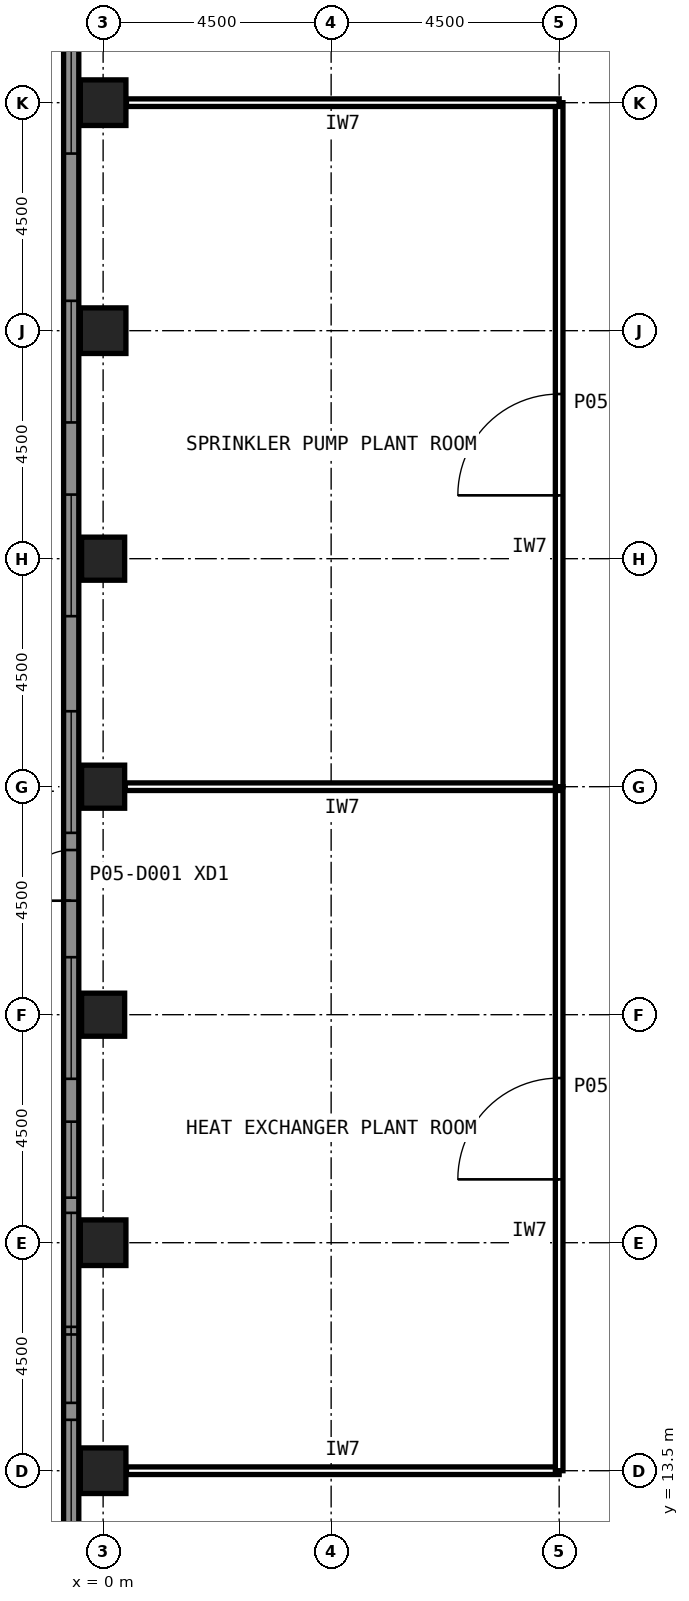
"""IFC4 building model, lengths in metres.
Left out: names, types, materials, properties, quantities, classifications, styles, units other than length and angle.
Written with IfcOpenShell. Run it as: python <this file> out.ifc"""

import sys

from ifc_helpers import new_model, si_unit, direction, frame, frame_2d, origin, origin_2d, place, context, subcontext, project, spatial, rectangle, hollow_rectangle, extrude, element, fill, save


model = new_model("IFC4")
c1 = context("Model", 3, precision=1e-05, world=origin(), true_north=direction((0.0, 1.0)))
c2 = subcontext(c1, "Body", "Model", "MODEL_VIEW")
j1 = project(units=[si_unit("LENGTHUNIT", "METRE"), si_unit("PLANEANGLEUNIT", "RADIAN")], contexts=[c1])
p1 = place(None, origin())
s1 = spatial("IfcSite", under=j1, at=p1, CompositionType="ELEMENT")
p2 = place(p1, origin())
s2 = spatial("IfcBuilding", under=s1, at=p2, CompositionType="ELEMENT")
p3 = place(p2, frame((0.0, 0.0, 23.0)))
s3 = spatial("IfcBuildingStorey", under=s2, at=p3, CompositionType="ELEMENT", Elevation=23.0)
for number, where, z_axis, x_axis in (
    (1, (0.0, 40.5, 0.0), (0.0, 0.0, 1.0), (1.0, 0.0, 0.0)),
    (2, (0.0, 36.0, 0.0), (0.0, 0.0, 1.0), (1.0, 0.0, 0.0)),
):
    element("IfcColumn", number, at=place(p3, frame(where, z_axis=z_axis, x_axis=x_axis)), inside=s3, PredefinedType="COLUMN", context=c2, shape_type="SweptSolid", body=[
        extrude(hollow_rectangle(XDim=0.9, YDim=0.9, WallThickness=0.063, at=origin_2d()), origin(), (0.0, 0.0, 1.0), 6.0),
    ])
for number, where, z_axis, x_axis in (
    (3, (0.0, 31.5, 0.0), (0.0, 0.0, 1.0), (1.0, 0.0, 0.0)),
    (4, (0.0, 27.0, 0.0), (0.0, 0.0, 1.0), (1.0, 0.0, 0.0)),
    (5, (0.0, 22.5, 0.0), (0.0, 0.0, 1.0), (1.0, 0.0, 0.0)),
):
    element("IfcColumn", number, at=place(p3, frame(where, z_axis=z_axis, x_axis=x_axis)), inside=s3, PredefinedType="COLUMN", context=c2, shape_type="SweptSolid", body=[
        extrude(hollow_rectangle(XDim=0.85, YDim=0.85, WallThickness=0.05, at=origin_2d()), origin(), (0.0, 0.0, 1.0), 6.0),
    ])
for number, where, z_axis, x_axis in (
    (6, (0.0, 18.0, 0.0), (0.0, 0.0, 1.0), (1.0, 0.0, 0.0)),
    (7, (0.0, 13.5, 0.0), (0.0, 0.0, 1.0), (1.0, 0.0, 0.0)),
):
    element("IfcColumn", number, at=place(p3, frame(where, z_axis=z_axis, x_axis=x_axis)), inside=s3, PredefinedType="COLUMN", context=c2, shape_type="SweptSolid", body=[
        extrude(hollow_rectangle(XDim=0.9, YDim=0.9, WallThickness=0.063, at=origin_2d()), origin(), (0.0, 0.0, 1.0), 6.0),
    ])
p4 = place(p3, frame((-0.63, 8.739, 0.0), z_axis=(0.0, 0.0, 1.0), x_axis=(0.0, 1.0, 0.0)))
e8 = element("IfcWall", 8, at=p4, inside=s3, PredefinedType="SOLIDWALL", context=c2, shape_type="SweptSolid", body=[
    extrude(rectangle(XDim=36.522, YDim=0.3, at=frame_2d((18.261, 0.0))), origin(), (0.0, 0.0, 1.0), 6.0),
])
p5 = place(p4, frame((16.011, 0.0, 0.0)))
e9 = element("IfcOpeningElement", 9, at=p5, cuts=e8, PredefinedType="OPENING", context=c2, shape_type="SweptSolid", body=[
    extrude(rectangle(XDim=1.0, YDim=2.1, at=frame_2d((0.5, 1.05))), frame((0.0, 0.16, 0.0), z_axis=(0.0, -1.0, 0.0), x_axis=(1.0, 0.0, 0.0)), (0.0, 0.0, 1.0), 0.32),
])
p6 = place(p4, frame((0.3, 0.0, 0.3)))
e10 = element("IfcOpeningElement", 10, at=p6, cuts=e8, PredefinedType="OPENING", context=c2, shape_type="SweptSolid", body=[
    extrude(rectangle(XDim=1.5, YDim=2.0, at=frame_2d((0.75, 1.0))), frame((0.0, 0.16, 0.0), z_axis=(0.0, -1.0, 0.0), x_axis=(1.0, 0.0, 0.0)), (0.0, 0.0, 1.0), 0.32),
])
p7 = place(p4, frame((3.365, 0.0, 1.2)))
e11 = element("IfcOpeningElement", 11, at=p7, cuts=e8, PredefinedType="OPENING", context=c2, shape_type="SweptSolid", body=[
    extrude(rectangle(XDim=2.4, YDim=3.0, at=frame_2d((1.2, 1.5))), frame((0.0, 0.16, 0.0), z_axis=(0.0, -1.0, 0.0), x_axis=(1.0, 0.0, 0.0)), (0.0, 0.0, 1.0), 0.32),
])
p8 = place(p4, frame((1.5, 0.0, 3.65)))
e12 = element("IfcOpeningElement", 12, at=p8, cuts=e8, PredefinedType="OPENING", context=c2, shape_type="SweptSolid", body=[
    extrude(rectangle(XDim=1.5, YDim=2.0, at=frame_2d((0.75, 1.0))), frame((0.0, 0.16, 0.0), z_axis=(0.0, -1.0, 0.0), x_axis=(1.0, 0.0, 0.0)), (0.0, 0.0, 1.0), 0.32),
])
p9 = place(p4, frame((6.1, 0.0, 3.6)))
e13 = element("IfcOpeningElement", 13, at=p9, cuts=e8, PredefinedType="OPENING", context=c2, shape_type="SweptSolid", body=[
    extrude(rectangle(XDim=1.5, YDim=2.0, at=frame_2d((0.75, 1.0))), frame((0.0, 0.16, 0.0), z_axis=(0.0, -1.0, 0.0), x_axis=(1.0, 0.0, 0.0)), (0.0, 0.0, 1.0), 0.32),
])
p10 = place(p4, frame((12.496, 0.0, 1.2)))
e14 = element("IfcOpeningElement", 14, at=p10, cuts=e8, PredefinedType="OPENING", context=c2, shape_type="SweptSolid", body=[
    extrude(rectangle(XDim=2.4, YDim=3.0, at=frame_2d((1.2, 1.5))), frame((0.0, 0.16, 0.0), z_axis=(0.0, -1.0, 0.0), x_axis=(1.0, 0.0, 0.0)), (0.0, 0.0, 1.0), 0.32),
])
p11 = place(p4, frame((7.45, 0.0, 0.3)))
e15 = element("IfcOpeningElement", 15, at=p11, cuts=e8, PredefinedType="OPENING", context=c2, shape_type="SweptSolid", body=[
    extrude(rectangle(XDim=2.4, YDim=3.0, at=frame_2d((1.2, 1.5))), frame((0.0, 0.16, 0.0), z_axis=(0.0, -1.0, 0.0), x_axis=(1.0, 0.0, 0.0)), (0.0, 0.0, 1.0), 0.32),
])
p12 = place(p4, frame((21.626, 0.0, 1.2)))
e16 = element("IfcOpeningElement", 16, at=p12, cuts=e8, PredefinedType="OPENING", context=c2, shape_type="SweptSolid", body=[
    extrude(rectangle(XDim=2.4, YDim=3.0, at=frame_2d((1.2, 1.5))), frame((0.0, 0.16, 0.0), z_axis=(0.0, -1.0, 0.0), x_axis=(1.0, 0.0, 0.0)), (0.0, 0.0, 1.0), 0.32),
])
p13 = place(p4, frame((10.15, 0.0, 0.3)))
e17 = element("IfcOpeningElement", 17, at=p13, cuts=e8, PredefinedType="OPENING", context=c2, shape_type="SweptSolid", body=[
    extrude(rectangle(XDim=1.5, YDim=2.0, at=frame_2d((0.75, 1.0))), frame((0.0, 0.16, 0.0), z_axis=(0.0, -1.0, 0.0), x_axis=(1.0, 0.0, 0.0)), (0.0, 0.0, 1.0), 0.32),
])
p14 = place(p4, frame((17.35, 0.0, 0.3)))
e18 = element("IfcOpeningElement", 18, at=p14, cuts=e8, PredefinedType="OPENING", context=c2, shape_type="SweptSolid", body=[
    extrude(rectangle(XDim=2.4, YDim=3.0, at=frame_2d((1.2, 1.5))), frame((0.0, 0.16, 0.0), z_axis=(0.0, -1.0, 0.0), x_axis=(1.0, 0.0, 0.0)), (0.0, 0.0, 1.0), 0.32),
])
p15 = place(p4, frame((30.757, 0.0, 1.2)))
e19 = element("IfcOpeningElement", 19, at=p15, cuts=e8, PredefinedType="OPENING", context=c2, shape_type="SweptSolid", body=[
    extrude(rectangle(XDim=2.4, YDim=3.0, at=frame_2d((1.2, 1.5))), frame((0.0, 0.16, 0.0), z_axis=(0.0, -1.0, 0.0), x_axis=(1.0, 0.0, 0.0)), (0.0, 0.0, 1.0), 0.32),
])
p16 = place(p4, frame((25.45, 0.0, 0.3)))
e20 = element("IfcOpeningElement", 20, at=p16, cuts=e8, PredefinedType="OPENING", context=c2, shape_type="SweptSolid", body=[
    extrude(rectangle(XDim=2.4, YDim=3.0, at=frame_2d((1.2, 1.5))), frame((0.0, 0.16, 0.0), z_axis=(0.0, -1.0, 0.0), x_axis=(1.0, 0.0, 0.0)), (0.0, 0.0, 1.0), 0.32),
])
p17 = place(p3, frame((0.46, 13.5, 0.0), z_axis=(0.0, 0.0, 1.0), x_axis=(1.0, 0.0, 0.0)))
e21 = element("IfcWall", 21, at=p17, inside=s3, PredefinedType="PARTITIONING", context=c2, shape_type="SweptSolid", body=[
    extrude(rectangle(XDim=8.54, YDim=0.15, at=frame_2d((4.27, 0.0))), origin(), (0.0, 0.0, 1.0), 4.989),
])
p18 = place(p3, frame((9.0, 13.5, 0.0), z_axis=(0.0, 0.0, 1.0), x_axis=(0.0, 1.0, 0.0)))
e22 = element("IfcWall", 22, at=p18, inside=s3, PredefinedType="PARTITIONING", context=c2, shape_type="SweptSolid", body=[
    extrude(rectangle(XDim=13.5, YDim=0.15, at=frame_2d((6.75, 0.0))), origin(), (0.0, 0.0, 1.0), 5.84),
])
p19 = place(p18, frame((5.75, 0.0, 0.0)))
e23 = element("IfcOpeningElement", 23, at=p19, cuts=e22, PredefinedType="OPENING", context=c2, shape_type="SweptSolid", body=[
    extrude(rectangle(XDim=2.0, YDim=2.4, at=frame_2d((1.0, 1.2))), frame((0.0, 0.085, 0.0), z_axis=(0.0, -1.0, 0.0), x_axis=(1.0, 0.0, 0.0)), (0.0, 0.0, 1.0), 0.17),
])
p20 = place(p3, frame((9.0, 27.0, 0.0), z_axis=(0.0, 0.0, 1.0), x_axis=(-1.0, 0.0, 0.0)))
e24 = element("IfcWall", 24, at=p20, inside=s3, PredefinedType="PARTITIONING", context=c2, shape_type="SweptSolid", body=[
    extrude(rectangle(XDim=8.565, YDim=0.15, at=frame_2d((4.282, 0.0))), origin(), (0.0, 0.0, 1.0), 4.989),
])
p21 = place(p3, frame((9.0, 27.0, 0.0), z_axis=(0.0, 0.0, 1.0), x_axis=(0.0, 1.0, 0.0)))
e25 = element("IfcWall", 25, at=p21, inside=s3, PredefinedType="PARTITIONING", context=c2, shape_type="SweptSolid", body=[
    extrude(rectangle(XDim=13.5, YDim=0.15, at=frame_2d((6.75, 0.0))), origin(), (0.0, 0.0, 1.0), 5.84),
])
p22 = place(p21, frame((5.75, 0.0, 0.0)))
e26 = element("IfcOpeningElement", 26, at=p22, cuts=e25, PredefinedType="OPENING", context=c2, shape_type="SweptSolid", body=[
    extrude(rectangle(XDim=2.0, YDim=2.4, at=frame_2d((1.0, 1.2))), frame((0.0, 0.085, 0.0), z_axis=(0.0, -1.0, 0.0), x_axis=(1.0, 0.0, 0.0)), (0.0, 0.0, 1.0), 0.17),
])
p23 = place(p3, frame((9.0, 40.5, 0.0), z_axis=(0.0, 0.0, 1.0), x_axis=(-1.0, 0.0, 0.0)))
e27 = element("IfcWall", 27, at=p23, inside=s3, PredefinedType="PARTITIONING", context=c2, shape_type="SweptSolid", body=[
    extrude(rectangle(XDim=8.54, YDim=0.15, at=frame_2d((4.27, 0.0))), origin(), (0.0, 0.0, 1.0), 4.989),
])
p24 = place(p5, origin())
e28 = element("IfcDoor", 28, at=p24, inside=s3, OperationType="SINGLE_SWING_LEFT", PredefinedType="DOOR", context=c2, shape_type="SweptSolid", body=[
    extrude(rectangle(XDim=1.0, YDim=2.1, at=frame_2d((0.5, 1.05))), frame((0.0, 0.025, 0.0), z_axis=(0.0, -1.0, 0.0), x_axis=(1.0, 0.0, 0.0)), (0.0, 0.0, 1.0), 0.05),
])
fill(e9, e28)
p25 = place(p7, origin())
e29 = element("IfcWindow", 29, at=p25, inside=s3, PartitioningType="SINGLE_PANEL", PredefinedType="USERDEFINED", context=c2, shape_type="SweptSolid", body=[
    extrude(rectangle(XDim=2.4, YDim=3.0, at=frame_2d((1.2, 1.5))), frame((0.0, 0.03, 0.0), z_axis=(0.0, -1.0, 0.0), x_axis=(1.0, 0.0, 0.0)), (0.0, 0.0, 1.0), 0.06),
])
fill(e11, e29)
p26 = place(p9, origin())
e30 = element("IfcWindow", 30, at=p26, inside=s3, PartitioningType="SINGLE_PANEL", PredefinedType="USERDEFINED", context=c2, shape_type="SweptSolid", body=[
    extrude(rectangle(XDim=1.5, YDim=2.0, at=frame_2d((0.75, 1.0))), frame((0.0, 0.03, 0.0), z_axis=(0.0, -1.0, 0.0), x_axis=(1.0, 0.0, 0.0)), (0.0, 0.0, 1.0), 0.06),
])
fill(e13, e30)
p27 = place(p10, origin())
e31 = element("IfcWindow", 31, at=p27, inside=s3, PartitioningType="SINGLE_PANEL", PredefinedType="USERDEFINED", context=c2, shape_type="SweptSolid", body=[
    extrude(rectangle(XDim=2.4, YDim=3.0, at=frame_2d((1.2, 1.5))), frame((0.0, 0.03, 0.0), z_axis=(0.0, -1.0, 0.0), x_axis=(1.0, 0.0, 0.0)), (0.0, 0.0, 1.0), 0.06),
])
fill(e14, e31)
p28 = place(p11, origin())
e32 = element("IfcWindow", 32, at=p28, inside=s3, PartitioningType="SINGLE_PANEL", PredefinedType="USERDEFINED", context=c2, shape_type="SweptSolid", body=[
    extrude(rectangle(XDim=2.4, YDim=3.0, at=frame_2d((1.2, 1.5))), frame((0.0, 0.03, 0.0), z_axis=(0.0, -1.0, 0.0), x_axis=(1.0, 0.0, 0.0)), (0.0, 0.0, 1.0), 0.06),
])
fill(e15, e32)
p29 = place(p12, origin())
e33 = element("IfcWindow", 33, at=p29, inside=s3, PartitioningType="SINGLE_PANEL", PredefinedType="USERDEFINED", context=c2, shape_type="SweptSolid", body=[
    extrude(rectangle(XDim=2.4, YDim=3.0, at=frame_2d((1.2, 1.5))), frame((0.0, 0.03, 0.0), z_axis=(0.0, -1.0, 0.0), x_axis=(1.0, 0.0, 0.0)), (0.0, 0.0, 1.0), 0.06),
])
fill(e16, e33)
p30 = place(p13, origin())
e34 = element("IfcWindow", 34, at=p30, inside=s3, PartitioningType="SINGLE_PANEL", PredefinedType="USERDEFINED", context=c2, shape_type="SweptSolid", body=[
    extrude(rectangle(XDim=1.5, YDim=2.0, at=frame_2d((0.75, 1.0))), frame((0.0, 0.03, 0.0), z_axis=(0.0, -1.0, 0.0), x_axis=(1.0, 0.0, 0.0)), (0.0, 0.0, 1.0), 0.06),
])
fill(e17, e34)
p31 = place(p14, origin())
e35 = element("IfcWindow", 35, at=p31, inside=s3, PartitioningType="SINGLE_PANEL", PredefinedType="USERDEFINED", context=c2, shape_type="SweptSolid", body=[
    extrude(rectangle(XDim=2.4, YDim=3.0, at=frame_2d((1.2, 1.5))), frame((0.0, 0.03, 0.0), z_axis=(0.0, -1.0, 0.0), x_axis=(1.0, 0.0, 0.0)), (0.0, 0.0, 1.0), 0.06),
])
fill(e18, e35)
p32 = place(p15, origin())
e36 = element("IfcWindow", 36, at=p32, inside=s3, PartitioningType="SINGLE_PANEL", PredefinedType="USERDEFINED", context=c2, shape_type="SweptSolid", body=[
    extrude(rectangle(XDim=2.4, YDim=3.0, at=frame_2d((1.2, 1.5))), frame((0.0, 0.03, 0.0), z_axis=(0.0, -1.0, 0.0), x_axis=(1.0, 0.0, 0.0)), (0.0, 0.0, 1.0), 0.06),
])
fill(e19, e36)
p33 = place(p16, origin())
e37 = element("IfcWindow", 37, at=p33, inside=s3, PartitioningType="SINGLE_PANEL", PredefinedType="USERDEFINED", context=c2, shape_type="SweptSolid", body=[
    extrude(rectangle(XDim=2.4, YDim=3.0, at=frame_2d((1.2, 1.5))), frame((0.0, 0.03, 0.0), z_axis=(0.0, -1.0, 0.0), x_axis=(1.0, 0.0, 0.0)), (0.0, 0.0, 1.0), 0.06),
])
fill(e20, e37)
p34 = place(p19, origin())
e38 = element("IfcDoor", 38, at=p34, inside=s3, OperationType="SINGLE_SWING_LEFT", PredefinedType="DOOR", context=c2, shape_type="SweptSolid", body=[
    extrude(rectangle(XDim=2.0, YDim=2.4, at=frame_2d((1.0, 1.2))), frame((0.0, 0.025, 0.0), z_axis=(0.0, -1.0, 0.0), x_axis=(1.0, 0.0, 0.0)), (0.0, 0.0, 1.0), 0.05),
])
fill(e23, e38)
p35 = place(p22, origin())
e39 = element("IfcDoor", 39, at=p35, inside=s3, OperationType="SINGLE_SWING_LEFT", PredefinedType="DOOR", context=c2, shape_type="SweptSolid", body=[
    extrude(rectangle(XDim=2.0, YDim=2.4, at=frame_2d((1.0, 1.2))), frame((0.0, 0.025, 0.0), z_axis=(0.0, -1.0, 0.0), x_axis=(1.0, 0.0, 0.0)), (0.0, 0.0, 1.0), 0.05),
])
fill(e26, e39)
save(model, sys.argv[1])
